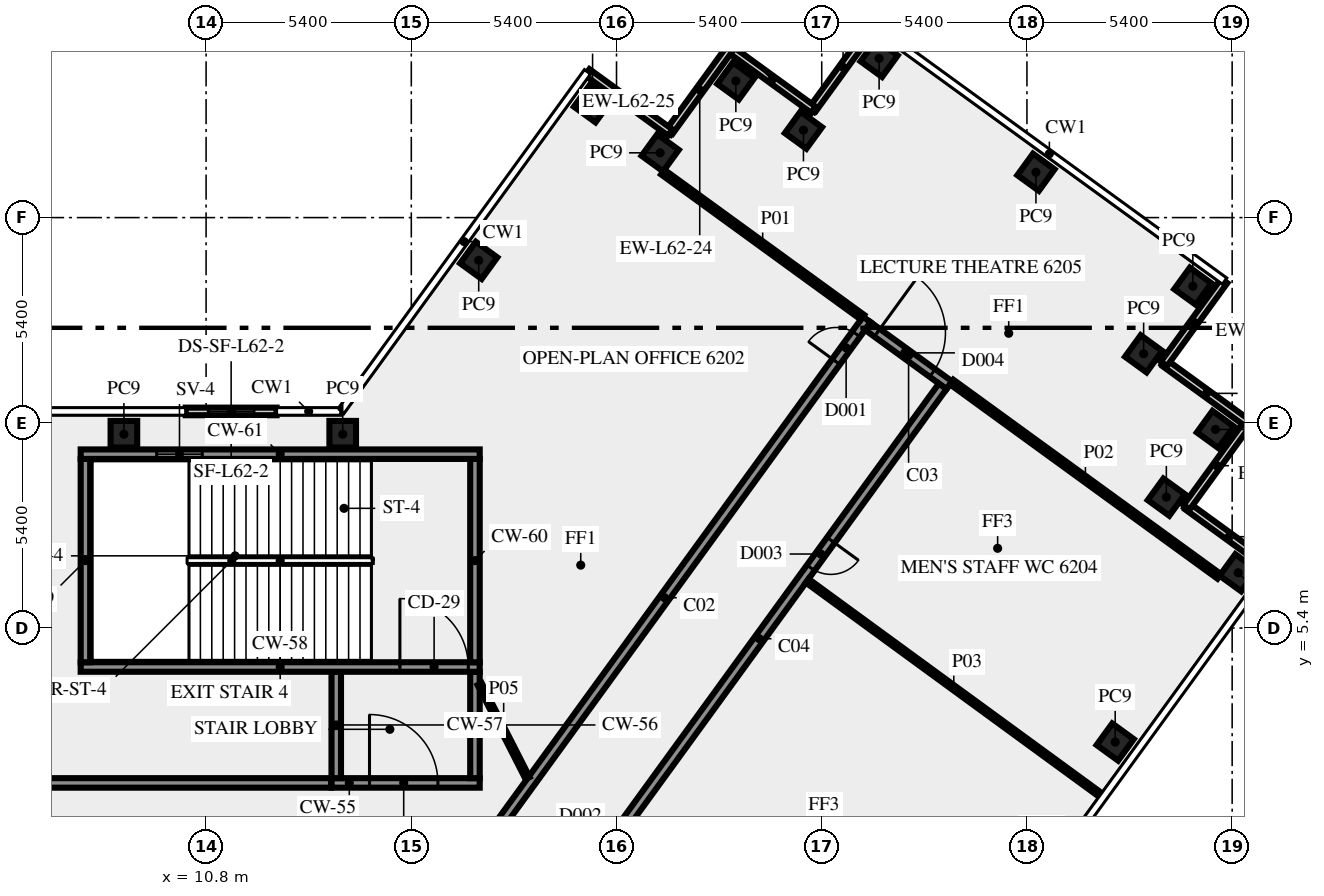
"""IFC4 building model, lengths in metres.
Left out: names, types, materials, properties, quantities, classifications, styles, units other than length and angle.
Written with IfcOpenShell. Run it as: python <this file> out.ifc"""

import sys

from ifc_helpers import new_model, si_unit, direction, frame, frame_2d, origin, origin_2d, place, context, subcontext, project, spatial, rectangle, extrude, element, fill, save


model = new_model("IFC4")
c1 = context("Model", 3, precision=1e-05, world=origin(), true_north=direction((0.0, 1.0)))
c2 = subcontext(c1, "Body", "Model", "MODEL_VIEW")
j1 = project(units=[si_unit("LENGTHUNIT", "METRE"), si_unit("PLANEANGLEUNIT", "RADIAN")], contexts=[c1])
p1 = place(None, origin())
s1 = spatial("IfcSite", under=j1, at=p1, CompositionType="ELEMENT")
p2 = place(p1, origin())
s2 = spatial("IfcBuilding", under=s1, at=p2, CompositionType="ELEMENT")
p3 = place(p2, frame((0.0, 0.0, 265.0)))
s3 = spatial("IfcBuildingStorey", under=s2, at=p3, CompositionType="ELEMENT", Elevation=265.0)
for number, where, z_axis, x_axis in (
    (1, (34.722, 2.4, 0.0), (0.0, 0.0, 1.0), (0.588, 0.809, 0.0)),
    (2, (37.96, 6.855, 0.0), (0.0, 0.0, 1.0), (0.588, 0.809, 0.0)),
    (3, (36.068, 8.844, 0.0), (0.0, 0.0, 1.0), (0.588, 0.809, 0.0)),
    (4, (37.36, 10.625, 0.0), (0.0, 0.0, 1.0), (0.588, 0.809, 0.0)),
    (5, (35.471, 12.616, 0.0), (0.0, 0.0, 1.0), (-0.809, 0.588, 0.0)),
    (6, (36.765, 14.395, 0.0), (0.0, 0.0, 1.0), (-0.809, 0.588, 0.0)),
    (7, (32.637, 17.393, 0.0), (0.0, 0.0, 1.0), (-0.809, 0.588, 0.0)),
    (8, (28.51, 20.39, 0.0), (0.0, 0.0, 1.0), (-0.588, -0.809, 0.0)),
    (9, (26.519, 18.5, 0.0), (0.0, 0.0, 1.0), (-0.809, 0.588, 0.0)),
    (10, (24.74, 19.795, 0.0), (0.0, 0.0, 1.0), (-0.588, -0.809, 0.0)),
    (11, (22.749, 17.904, 0.0), (0.0, 0.0, 1.0), (-0.588, -0.809, 0.0)),
    (12, (20.97, 19.195, 0.0), (0.0, 0.0, 1.0), (-0.588, -0.809, 0.0)),
    (13, (17.974, 15.075, 0.0), (0.0, 0.0, 1.0), (-0.588, -0.809, 0.0)),
    (14, (14.395, 10.5, 0.0), (0.0, 0.0, 1.0), (-1.0, 0.0, 0.0)),
    (15, (8.637, 10.5, 0.0), (0.0, 0.0, 1.0), (-1.0, 0.0, 0.0)),
):
    element("IfcColumn", number, at=place(p3, frame(where, z_axis=z_axis, x_axis=x_axis)), inside=s3, PredefinedType="COLUMN", context=c2, shape_type="SweptSolid", body=[
        extrude(rectangle(XDim=0.7, YDim=0.7, at=origin_2d()), origin(), (0.0, 0.0, 1.0), 3.65),
    ])
for number, where, z_axis, x_axis in (
    (16, (38.814, 7.01, 0.0), (0.0, 0.0, 1.0), (-0.809, 0.588, 0.0)),
    (17, (36.602, 8.58, 0.0), (0.0, 0.0, 1.0), (0.588, 0.809, 0.0)),
    (18, (38.216, 10.782, 0.0), (0.0, 0.0, 1.0), (-0.809, 0.588, 0.0)),
    (19, (36.005, 12.352, 0.0), (0.0, 0.0, 1.0), (0.588, 0.809, 0.0)),
):
    element("IfcWall", number, at=place(p3, frame(where, z_axis=z_axis, x_axis=x_axis)), inside=s3, PredefinedType="SOLIDWALL", context=c2, shape_type="SweptSolid", body=[
        extrude(rectangle(XDim=2.7, YDim=0.2, at=frame_2d((1.35, 0.0))), origin(), (0.0, 0.0, 1.0), 3.65),
    ])
for number, where, z_axis, x_axis in (
    (20, (28.354, 21.247, 0.0), (0.0, 0.0, 1.0), (-0.588, -0.809, 0.0)),
    (21, (26.785, 19.036, 0.0), (0.0, 0.0, 1.0), (-0.809, 0.588, 0.0)),
):
    element("IfcWall", number, at=place(p3, frame(where, z_axis=z_axis, x_axis=x_axis)), inside=s3, PredefinedType="SOLIDWALL", context=c2, shape_type="SweptSolid", body=[
        extrude(rectangle(XDim=2.7, YDim=0.2, at=frame_2d((1.35, 0.0))), origin(), (0.0, 0.0, 1.0), 3.65),
    ])
for number, where, z_axis, x_axis in (
    (22, (24.583, 20.65, 0.0), (0.0, 0.0, 1.0), (-0.588, -0.809, 0.0)),
    (23, (23.013, 18.438, 0.0), (0.0, 0.0, 1.0), (-0.809, 0.588, 0.0)),
):
    element("IfcWall", number, at=place(p3, frame(where, z_axis=z_axis, x_axis=x_axis)), inside=s3, PredefinedType="SOLIDWALL", context=c2, shape_type="SweptSolid", body=[
        extrude(rectangle(XDim=2.7, YDim=0.2, at=frame_2d((1.35, 0.0))), origin(), (0.0, 0.0, 1.0), 3.65),
    ])
p4 = place(p3, frame((12.655, 11.1, 0.0), z_axis=(0.0, 0.0, 1.0), x_axis=(-1.0, 0.0, 0.0)))
e24 = element("IfcWall", 24, at=p4, inside=s3, PredefinedType="SOLIDWALL", context=c2, shape_type="SweptSolid", body=[
    extrude(rectangle(XDim=2.392, YDim=0.2, at=frame_2d((1.196, 0.0))), origin(), (0.0, 0.0, 1.0), 3.65),
])
p5 = place(p4, frame((0.596, 0.0, 1.0)))
e25 = element("IfcOpeningElement", 25, at=p5, cuts=e24, PredefinedType="OPENING", context=c2, shape_type="SweptSolid", body=[
    extrude(rectangle(XDim=1.2, YDim=1.2, at=frame_2d((0.6, 0.6))), frame((0.0, 0.11, 0.0), z_axis=(0.0, -1.0, 0.0), x_axis=(1.0, 0.0, 0.0)), (0.0, 0.0, 1.0), 0.22),
])
p6 = place(p3, frame((14.1, 1.325, 0.0), z_axis=(0.0, 0.0, 1.0), x_axis=(1.0, 0.0, 0.0)))
e26 = element("IfcWall", 26, at=p6, inside=s3, PredefinedType="SHEAR", context=c2, shape_type="SweptSolid", body=[
    extrude(rectangle(XDim=3.9, YDim=0.25, at=frame_2d((1.95, 0.0))), origin(), (0.0, 0.0, 1.0), 3.65),
])
p7 = place(p6, frame((1.0, 0.0, 0.0)))
e27 = element("IfcOpeningElement", 27, at=p7, cuts=e26, PredefinedType="OPENING", context=c2, shape_type="SweptSolid", body=[
    extrude(rectangle(XDim=1.8, YDim=2.1, at=frame_2d((0.9, 1.05))), frame((0.0, 0.135, 0.0), z_axis=(0.0, -1.0, 0.0), x_axis=(1.0, 0.0, 0.0)), (0.0, 0.0, 1.0), 0.27),
])
for number, where, z_axis, x_axis in (
    (28, (14.225, 1.45, 0.0), (0.0, 0.0, 1.0), (0.0, 1.0, 0.0)),
    (29, (17.875, 1.45, 0.0), (0.0, 0.0, 1.0), (0.0, 1.0, 0.0)),
):
    element("IfcWall", number, at=place(p3, frame(where, z_axis=z_axis, x_axis=x_axis)), inside=s3, PredefinedType="SHEAR", context=c2, shape_type="SweptSolid", body=[
        extrude(rectangle(XDim=2.8, YDim=0.25, at=frame_2d((1.4, 0.0))), origin(), (0.0, 0.0, 1.0), 3.65),
    ])
p8 = place(p3, frame((7.5, 4.375, 0.0), z_axis=(0.0, 0.0, 1.0), x_axis=(1.0, 0.0, 0.0)))
e30 = element("IfcWall", 30, at=p8, inside=s3, PredefinedType="SHEAR", context=c2, shape_type="SweptSolid", body=[
    extrude(rectangle(XDim=10.5, YDim=0.25, at=frame_2d((5.25, 0.0))), origin(), (0.0, 0.0, 1.0), 3.65),
])
p9 = place(p8, frame((8.4, 0.0, 0.0)))
e31 = element("IfcOpeningElement", 31, at=p9, cuts=e30, PredefinedType="OPENING", context=c2, shape_type="SweptSolid", body=[
    extrude(rectangle(XDim=1.8, YDim=2.1, at=frame_2d((0.9, 1.05))), frame((0.0, 0.135, 0.0), z_axis=(0.0, -1.0, 0.0), x_axis=(1.0, 0.0, 0.0)), (0.0, 0.0, 1.0), 0.27),
])
for number, where, z_axis, x_axis in (
    (32, (7.625, 4.5, 0.0), (0.0, 0.0, 1.0), (0.0, 1.0, 0.0)),
    (33, (17.875, 4.5, 0.0), (0.0, 0.0, 1.0), (0.0, 1.0, 0.0)),
):
    element("IfcWall", number, at=place(p3, frame(where, z_axis=z_axis, x_axis=x_axis)), inside=s3, PredefinedType="SHEAR", context=c2, shape_type="SweptSolid", body=[
        extrude(rectangle(XDim=5.35, YDim=0.25, at=frame_2d((2.675, 0.0))), origin(), (0.0, 0.0, 1.0), 3.65),
    ])
p10 = place(p3, frame((7.5, 9.975, 0.0), z_axis=(0.0, 0.0, 1.0), x_axis=(1.0, 0.0, 0.0)))
e34 = element("IfcWall", 34, at=p10, inside=s3, PredefinedType="SHEAR", context=c2, shape_type="SweptSolid", body=[
    extrude(rectangle(XDim=10.5, YDim=0.25, at=frame_2d((5.25, 0.0))), origin(), (0.0, 0.0, 1.0), 3.65),
])
p11 = place(p10, frame((2.0, 0.0, 1.0)))
e35 = element("IfcOpeningElement", 35, at=p11, cuts=e34, PredefinedType="OPENING", context=c2, shape_type="SweptSolid", body=[
    extrude(rectangle(XDim=1.2, YDim=1.2, at=frame_2d((0.6, 0.6))), frame((0.0, 0.135, 0.0), z_axis=(0.0, -1.0, 0.0), x_axis=(1.0, 0.0, 0.0)), (0.0, 0.0, 1.0), 0.27),
])
p12 = place(p3, frame((-5.341, 1.325, 0.0), z_axis=(0.0, 0.0, 1.0), x_axis=(1.0, 0.0, 0.0)))
e36 = element("IfcWall", 36, at=p12, inside=s3, PredefinedType="SOLIDWALL", context=c2, shape_type="SweptSolid", body=[
    extrude(rectangle(XDim=19.431, YDim=0.25, at=frame_2d((9.716, 0.0))), origin(), (0.0, 0.0, 1.0), 3.65),
])
p13 = place(p12, frame((8.866, 0.0, 0.0)))
e37 = element("IfcOpeningElement", 37, at=p13, cuts=e36, PredefinedType="OPENING", context=c2, shape_type="SweptSolid", body=[
    extrude(rectangle(XDim=1.8, YDim=2.1, at=frame_2d((0.9, 1.05))), frame((0.0, 0.135, 0.0), z_axis=(0.0, -1.0, 0.0), x_axis=(1.0, 0.0, 0.0)), (0.0, 0.0, 1.0), 0.27),
])
p14 = place(p3, frame((17.545, -1.125, 0.0), z_axis=(0.0, 0.0, 1.0), x_axis=(0.58779555165, 0.809009511354, 0.0)))
e38 = element("IfcWall", 38, at=p14, inside=s3, PredefinedType="SOLIDWALL", context=c2, shape_type="SweptSolid", body=[
    extrude(rectangle(XDim=18.103, YDim=0.25, at=frame_2d((9.052, 0.0))), origin(), (0.0, 0.0, 1.0), 3.65),
])
p15 = place(p14, frame((16.728, 0.0, 0.0)))
e39 = element("IfcOpeningElement", 39, at=p15, cuts=e38, PredefinedType="OPENING", context=c2, shape_type="SweptSolid", body=[
    extrude(rectangle(XDim=0.9, YDim=2.1, at=frame_2d((0.45, 1.05))), frame((0.0, 0.135, 0.0), z_axis=(0.0, -1.0, 0.0), x_axis=(1.0, 0.0, 0.0)), (0.0, 0.0, 1.0), 0.27),
])
p16 = place(p3, frame((28.213, 13.346, 0.0), z_axis=(0.0, 0.0, 1.0), x_axis=(0.809006914995, -0.587799125119, 0.0)))
e40 = element("IfcWall", 40, at=p16, inside=s3, PredefinedType="SOLIDWALL", context=c2, shape_type="SweptSolid", body=[
    extrude(rectangle(XDim=2.65, YDim=0.25, at=frame_2d((1.325, 0.0))), origin(), (0.0, 0.0, 1.0), 3.65),
])
p17 = place(p16, frame((0.3, 0.0, 0.0)))
e41 = element("IfcOpeningElement", 41, at=p17, cuts=e40, PredefinedType="OPENING", context=c2, shape_type="SweptSolid", body=[
    extrude(rectangle(XDim=1.8, YDim=2.1, at=frame_2d((0.9, 1.05))), frame((0.0, 0.135, 0.0), z_axis=(0.0, -1.0, 0.0), x_axis=(1.0, 0.0, 0.0)), (0.0, 0.0, 1.0), 0.27),
])
p18 = place(p3, frame((30.183, 11.761, 0.0), z_axis=(0.0, 0.0, 1.0), x_axis=(-0.587781762867, -0.80901952958, 0.0)))
e42 = element("IfcWall", 42, at=p18, inside=s3, PredefinedType="SOLIDWALL", context=c2, shape_type="SweptSolid", body=[
    extrude(rectangle(XDim=16.42, YDim=0.25, at=frame_2d((8.21, 0.0))), origin(), (0.0, 0.0, 1.0), 3.65),
])
p19 = place(p18, frame((5.005, 0.0, 0.0)))
e43 = element("IfcOpeningElement", 43, at=p19, cuts=e42, PredefinedType="OPENING", context=c2, shape_type="SweptSolid", body=[
    extrude(rectangle(XDim=0.9, YDim=2.1, at=frame_2d((0.45, 1.05))), frame((0.0, 0.135, 0.0), z_axis=(0.0, -1.0, 0.0), x_axis=(1.0, 0.0, 0.0)), (0.0, 0.0, 1.0), 0.27),
])
p20 = place(p18, frame((14.988, 0.0, 0.0)))
e44 = element("IfcOpeningElement", 44, at=p20, cuts=e42, PredefinedType="OPENING", context=c2, shape_type="SweptSolid", body=[
    extrude(rectangle(XDim=0.9, YDim=2.1, at=frame_2d((0.45, 1.05))), frame((0.0, 0.135, 0.0), z_axis=(0.0, -1.0, 0.0), x_axis=(1.0, 0.0, 0.0)), (0.0, 0.0, 1.0), 0.27),
])
p21 = place(p3, frame((28.073, 13.578, 0.0), z_axis=(0.0, 0.0, 1.0), x_axis=(-0.809000932727, 0.587807358619, 0.0)))
e45 = element("IfcWall", 45, at=p21, inside=s3, PredefinedType="PARTITIONING", context=c2, shape_type="SweptSolid", body=[
    extrude(rectangle(XDim=6.496, YDim=0.15, at=frame_2d((3.248, 0.0))), origin(), (0.0, 0.0, 1.0), 3.65),
])
p22 = place(p3, frame((37.458, 6.76, 0.0), z_axis=(0.0, 0.0, 1.0), x_axis=(-0.809016295501, 0.587786214209, 0.0)))
e46 = element("IfcWall", 46, at=p22, inside=s3, PredefinedType="PARTITIONING", context=c2, shape_type="SweptSolid", body=[
    extrude(rectangle(XDim=8.7, YDim=0.15, at=frame_2d((4.35, 0.0))), origin(), (0.0, 0.0, 1.0), 3.65),
])
p23 = place(p3, frame((26.619, 6.643, 0.0), z_axis=(0.0, 0.0, 1.0), x_axis=(0.807594822539, -0.589737740532, 0.0)))
e47 = element("IfcWall", 47, at=p23, inside=s3, PredefinedType="PARTITIONING", context=c2, shape_type="SweptSolid", body=[
    extrude(rectangle(XDim=9.55, YDim=0.12, at=frame_2d((4.775, 0.0))), origin(), (0.0, 0.0, 1.0), 2.95),
])
p24 = place(p3, frame((18.0, 3.925, 0.0), z_axis=(0.0, 0.0, 1.0), x_axis=(0.453950796792, -0.891026752736, 0.0)))
e48 = element("IfcWall", 48, at=p24, inside=s3, PredefinedType="PARTITIONING", context=c2, shape_type="SweptSolid", body=[
    extrude(rectangle(XDim=2.778, YDim=0.12, at=frame_2d((1.389, 0.0))), origin(), (0.0, 0.0, 1.0), 3.65),
])
p25 = place(p5, origin())
e49 = element("IfcWindow", 49, at=p25, inside=s3, PartitioningType="SINGLE_PANEL", PredefinedType="WINDOW", context=c2, shape_type="SweptSolid", body=[
    extrude(rectangle(XDim=1.2, YDim=1.2, at=frame_2d((0.6, 0.6))), frame((0.0, 0.03, 0.0), z_axis=(0.0, -1.0, 0.0), x_axis=(1.0, 0.0, 0.0)), (0.0, 0.0, 1.0), 0.06),
])
fill(e25, e49)
p26 = place(p7, origin())
e50 = element("IfcDoor", 50, at=p26, inside=s3, OperationType="DOUBLE_DOOR_SINGLE_SWING", PredefinedType="DOOR", context=c2, shape_type="SweptSolid", body=[
    extrude(rectangle(XDim=1.8, YDim=2.1, at=frame_2d((0.9, 1.05))), frame((0.0, 0.025, 0.0), z_axis=(0.0, -1.0, 0.0), x_axis=(1.0, 0.0, 0.0)), (0.0, 0.0, 1.0), 0.05),
])
fill(e27, e50)
p27 = place(p9, origin())
e51 = element("IfcDoor", 51, at=p27, inside=s3, OperationType="DOUBLE_DOOR_SINGLE_SWING", PredefinedType="DOOR", context=c2, shape_type="SweptSolid", body=[
    extrude(rectangle(XDim=1.8, YDim=2.1, at=frame_2d((0.9, 1.05))), frame((0.0, 0.025, 0.0), z_axis=(0.0, -1.0, 0.0), x_axis=(1.0, 0.0, 0.0)), (0.0, 0.0, 1.0), 0.05),
])
fill(e31, e51)
p28 = place(p11, origin())
e52 = element("IfcWindow", 52, at=p28, inside=s3, PartitioningType="SINGLE_PANEL", PredefinedType="WINDOW", context=c2, shape_type="SweptSolid", body=[
    extrude(rectangle(XDim=1.2, YDim=1.2, at=frame_2d((0.6, 0.6))), frame((0.0, 0.03, 0.0), z_axis=(0.0, -1.0, 0.0), x_axis=(1.0, 0.0, 0.0)), (0.0, 0.0, 1.0), 0.06),
])
fill(e35, e52)
p29 = place(p15, origin())
e53 = element("IfcDoor", 53, at=p29, inside=s3, OperationType="SINGLE_SWING_RIGHT", PredefinedType="DOOR", context=c2, shape_type="SweptSolid", body=[
    extrude(rectangle(XDim=0.9, YDim=2.1, at=frame_2d((0.45, 1.05))), frame((0.0, 0.025, 0.0), z_axis=(0.0, -1.0, 0.0), x_axis=(1.0, 0.0, 0.0)), (0.0, 0.0, 1.0), 0.05),
])
fill(e39, e53)
p30 = place(p19, origin())
e54 = element("IfcDoor", 54, at=p30, inside=s3, OperationType="SINGLE_SWING_RIGHT", PredefinedType="DOOR", context=c2, shape_type="SweptSolid", body=[
    extrude(rectangle(XDim=0.9, YDim=2.1, at=frame_2d((0.45, 1.05))), frame((0.0, 0.025, 0.0), z_axis=(0.0, -1.0, 0.0), x_axis=(1.0, 0.0, 0.0)), (0.0, 0.0, 1.0), 0.05),
])
fill(e43, e54)
p31 = place(p17, origin())
e55 = element("IfcDoor", 55, at=p31, inside=s3, OperationType="DOUBLE_DOOR_SINGLE_SWING", PredefinedType="DOOR", context=c2, shape_type="SweptSolid", body=[
    extrude(rectangle(XDim=1.8, YDim=2.1, at=frame_2d((0.9, 1.05))), frame((0.0, 0.025, 0.0), z_axis=(0.0, -1.0, 0.0), x_axis=(1.0, 0.0, 0.0)), (0.0, 0.0, 1.0), 0.05),
])
fill(e41, e55)
save(model, sys.argv[1])
